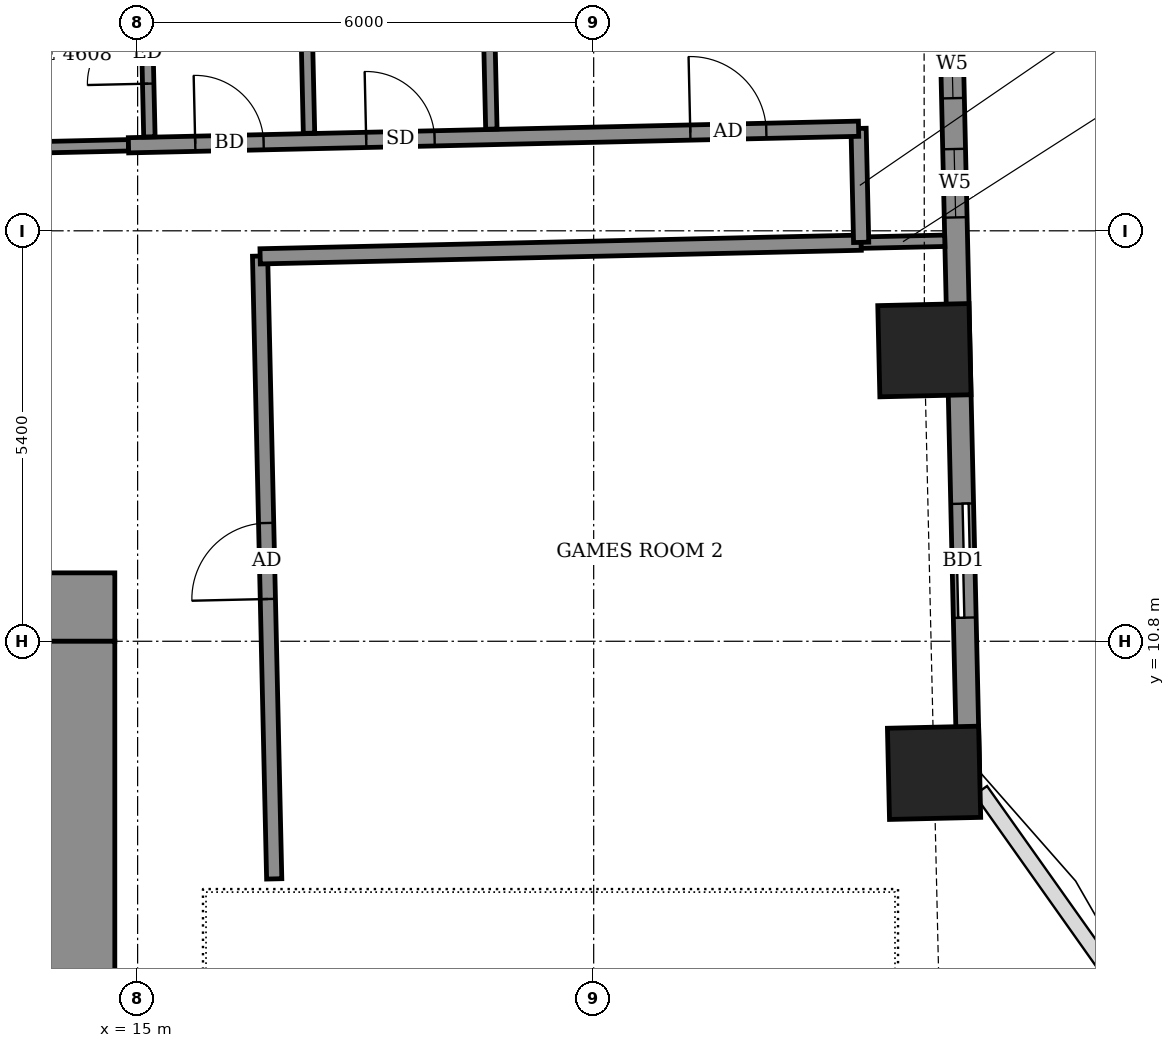
"""IFC4 building model, lengths in metres.
Left out: names, types, materials, properties, quantities, classifications, styles, units other than length and angle.
Written with IfcOpenShell. Run it as: python <this file> out.ifc"""

import sys

from ifc_helpers import new_model, si_unit, direction, frame, frame_2d, origin, origin_2d, place, context, subcontext, project, spatial, rectangle, extrude, element, fill, save


model = new_model("IFC4")
c1 = context("Model", 3, precision=1e-05, world=origin(), true_north=direction((0.0, 1.0)))
c2 = subcontext(c1, "Body", "Model", "MODEL_VIEW")
j1 = project(units=[si_unit("LENGTHUNIT", "METRE"), si_unit("PLANEANGLEUNIT", "RADIAN")], contexts=[c1])
p1 = place(None, origin())
s1 = spatial("IfcSite", under=j1, at=p1, CompositionType="ELEMENT")
p2 = place(p1, origin())
s2 = spatial("IfcBuilding", under=s1, at=p2, CompositionType="ELEMENT")
p3 = place(p2, frame((0.0, 0.0, 182.5)))
s3 = spatial("IfcBuildingStorey", under=s2, at=p3, CompositionType="ELEMENT", Elevation=182.5)
for number, where, z_axis, x_axis in (
    (1, (25.478, 9.069, -0.55), (0.0, 0.0, 1.0), (-0.023, 1.0, 0.0)),
    (2, (25.351, 14.629, -0.55), (0.0, 0.0, 1.0), (-0.023, 1.0, 0.0)),
):
    element("IfcColumn", number, at=place(p3, frame(where, z_axis=z_axis, x_axis=x_axis)), inside=s3, PredefinedType="COLUMN", context=c2, shape_type="SweptSolid", body=[
        extrude(rectangle(XDim=1.2, YDim=1.2, at=origin_2d()), origin(), (0.0, 0.0, 1.0), 3.6),
    ])
p4 = place(p3, frame((25.929, 9.025, 0.0), z_axis=(0.0, 0.0, 1.0), x_axis=(-0.022667601583, 0.999743056909, 0.0)))
e3 = element("IfcWall", 3, at=p4, inside=s3, PredefinedType="SOLIDWALL", context=c2, shape_type="SweptSolid", body=[
    extrude(rectangle(XDim=11.029, YDim=0.3, at=frame_2d((5.515, 0.0))), origin(), (0.0, 0.0, 1.0), 3.05),
])
p5 = place(p4, frame((2.086, 0.0, 0.0)))
e4 = element("IfcOpeningElement", 4, at=p5, cuts=e3, PredefinedType="OPENING", context=c2, shape_type="SweptSolid", body=[
    extrude(rectangle(XDim=1.5, YDim=2.4, at=frame_2d((0.75, 1.2))), frame((0.0, 0.16, 0.0), z_axis=(0.0, -1.0, 0.0), x_axis=(1.0, 0.0, 0.0)), (0.0, 0.0, 1.0), 0.32),
])
p6 = place(p4, frame((7.353, 0.0, 0.9)))
e5 = element("IfcOpeningElement", 5, at=p6, cuts=e3, PredefinedType="OPENING", context=c2, shape_type="SweptSolid", body=[
    extrude(rectangle(XDim=0.9, YDim=1.5, at=frame_2d((0.45, 0.75))), frame((0.0, 0.16, 0.0), z_axis=(0.0, -1.0, 0.0), x_axis=(1.0, 0.0, 0.0)), (0.0, 0.0, 1.0), 0.32),
])
p7 = place(p4, frame((8.922, 0.0, 0.9)))
e6 = element("IfcOpeningElement", 6, at=p7, cuts=e3, PredefinedType="OPENING", context=c2, shape_type="SweptSolid", body=[
    extrude(rectangle(XDim=0.9, YDim=1.5, at=frame_2d((0.45, 0.75))), frame((0.0, 0.16, 0.0), z_axis=(0.0, -1.0, 0.0), x_axis=(1.0, 0.0, 0.0)), (0.0, 0.0, 1.0), 0.32),
])
p8 = place(p3, frame((16.797, 7.674, 0.0), z_axis=(0.0, 0.0, 1.0), x_axis=(-0.022698399288, 0.999742358145, 0.0)))
e7 = element("IfcWall", 7, at=p8, inside=s3, PredefinedType="PARTITIONING", context=c2, shape_type="SweptSolid", body=[
    extrude(rectangle(XDim=8.196, YDim=0.2, at=frame_2d((4.098, 0.0))), origin(), (0.0, 0.0, 1.0), 3.05),
])
p9 = place(p8, frame((3.683, 0.0, 0.0)))
e8 = element("IfcOpeningElement", 8, at=p9, cuts=e7, PredefinedType="OPENING", context=c2, shape_type="SweptSolid", body=[
    extrude(rectangle(XDim=1.0, YDim=2.1, at=frame_2d((0.5, 1.05))), frame((0.0, 0.11, 0.0), z_axis=(0.0, -1.0, 0.0), x_axis=(1.0, 0.0, 0.0)), (0.0, 0.0, 1.0), 0.22),
])
p10 = place(p3, frame((16.612, 15.864, 0.0), z_axis=(0.0, 0.0, 1.0), x_axis=(0.999741181744, 0.022750154412, 0.0)))
e9 = element("IfcWall", 9, at=p10, inside=s3, PredefinedType="PARTITIONING", context=c2, shape_type="SweptSolid", body=[
    extrude(rectangle(XDim=7.909, YDim=0.2, at=frame_2d((3.955, 0.0))), origin(), (0.0, 0.0, 1.0), 3.05),
])
p11 = place(p3, frame((24.519, 16.044, 0.0), z_axis=(0.0, 0.0, 1.0), x_axis=(0.999738732953, 0.022857511541, 0.0)))
e10 = element("IfcWall", 10, at=p11, inside=s3, PredefinedType="PARTITIONING", context=c2, shape_type="SweptSolid", body=[
    extrude(rectangle(XDim=1.1, YDim=0.15, at=frame_2d((0.55, 0.0))), origin(), (0.0, 0.0, 1.0), 2.55),
])
p12 = place(p3, frame((24.519, 16.048, 0.0), z_axis=(0.0, 0.0, 1.0), x_axis=(-0.022632637625, 0.99974384905, 0.0)))
e11 = element("IfcWall", 11, at=p12, inside=s3, PredefinedType="PARTITIONING", context=c2, shape_type="SweptSolid", body=[
    extrude(rectangle(XDim=1.5, YDim=0.2, at=frame_2d((0.75, 0.0))), origin(), (0.0, 0.0, 1.0), 3.05),
])
p13 = place(p3, frame((-15.649, 16.633, 0.0), z_axis=(0.0, 0.0, 1.0), x_axis=(0.999743261737, 0.022658565952, 0.0)))
e12 = element("IfcWall", 12, at=p13, inside=s3, PredefinedType="PARTITIONING", context=c2, shape_type="SweptSolid", body=[
    extrude(rectangle(XDim=30.536, YDim=0.15, at=frame_2d((15.268, 0.0))), origin(), (0.0, 0.0, 1.0), 3.05),
])
p14 = place(p13, frame((24.44, 0.0, 0.0)))
e13 = element("IfcOpeningElement", 13, at=p14, cuts=e12, PredefinedType="OPENING", context=c2, shape_type="SweptSolid", body=[
    extrude(rectangle(XDim=0.9, YDim=2.1, at=frame_2d((0.45, 1.05))), frame((0.0, 0.085, 0.0), z_axis=(0.0, -1.0, 0.0), x_axis=(1.0, 0.0, 0.0)), (0.0, 0.0, 1.0), 0.17),
])
p15 = place(p13, frame((22.365, 0.0, 0.0)))
e14 = element("IfcOpeningElement", 14, at=p15, cuts=e12, PredefinedType="OPENING", context=c2, shape_type="SweptSolid", body=[
    extrude(rectangle(XDim=0.9, YDim=2.1, at=frame_2d((0.45, 1.05))), frame((0.0, 0.085, 0.0), z_axis=(0.0, -1.0, 0.0), x_axis=(1.0, 0.0, 0.0)), (0.0, 0.0, 1.0), 0.17),
])
p16 = place(p13, frame((15.515, 0.0, 0.0)))
e15 = element("IfcOpeningElement", 15, at=p16, cuts=e12, PredefinedType="OPENING", context=c2, shape_type="SweptSolid", body=[
    extrude(rectangle(XDim=0.9, YDim=2.1, at=frame_2d((0.45, 1.05))), frame((0.0, 0.085, 0.0), z_axis=(0.0, -1.0, 0.0), x_axis=(1.0, 0.0, 0.0)), (0.0, 0.0, 1.0), 0.17),
])
p17 = place(p13, frame((13.44, 0.0, 0.0)))
e16 = element("IfcOpeningElement", 16, at=p17, cuts=e12, PredefinedType="OPENING", context=c2, shape_type="SweptSolid", body=[
    extrude(rectangle(XDim=0.9, YDim=2.1, at=frame_2d((0.45, 1.05))), frame((0.0, 0.085, 0.0), z_axis=(0.0, -1.0, 0.0), x_axis=(1.0, 0.0, 0.0)), (0.0, 0.0, 1.0), 0.17),
])
p18 = place(p13, frame((6.565, 0.0, 0.0)))
e17 = element("IfcOpeningElement", 17, at=p18, cuts=e12, PredefinedType="OPENING", context=c2, shape_type="SweptSolid", body=[
    extrude(rectangle(XDim=0.9, YDim=2.1, at=frame_2d((0.45, 1.05))), frame((0.0, 0.085, 0.0), z_axis=(0.0, -1.0, 0.0), x_axis=(1.0, 0.0, 0.0)), (0.0, 0.0, 1.0), 0.17),
])
p19 = place(p13, frame((4.415, 0.0, 0.0)))
e18 = element("IfcOpeningElement", 18, at=p19, cuts=e12, PredefinedType="OPENING", context=c2, shape_type="SweptSolid", body=[
    extrude(rectangle(XDim=0.9, YDim=2.1, at=frame_2d((0.45, 1.05))), frame((0.0, 0.085, 0.0), z_axis=(0.0, -1.0, 0.0), x_axis=(1.0, 0.0, 0.0)), (0.0, 0.0, 1.0), 0.17),
])
p20 = place(p13, frame((0.2, 0.0, 0.0)))
e19 = element("IfcOpeningElement", 19, at=p20, cuts=e12, PredefinedType="OPENING", context=c2, shape_type="SweptSolid", body=[
    extrude(rectangle(XDim=0.9, YDim=2.1, at=frame_2d((0.45, 1.05))), frame((0.0, 0.085, 0.0), z_axis=(0.0, -1.0, 0.0), x_axis=(1.0, 0.0, 0.0)), (0.0, 0.0, 1.0), 0.17),
])
p21 = place(p3, frame((14.88, 17.325, 0.0), z_axis=(0.0, 0.0, 1.0), x_axis=(0.999742504166, 0.022691966963, 0.0)))
e20 = element("IfcWall", 20, at=p21, inside=s3, PredefinedType="PARTITIONING", context=c2, shape_type="SweptSolid", body=[
    extrude(rectangle(XDim=9.608, YDim=0.2, at=frame_2d((4.804, 0.0))), origin(), (0.0, 0.0, 1.0), 3.05),
])
p22 = place(p21, frame((7.393, 0.0, 0.0)))
e21 = element("IfcOpeningElement", 21, at=p22, cuts=e20, PredefinedType="OPENING", context=c2, shape_type="SweptSolid", body=[
    extrude(rectangle(XDim=1.0, YDim=2.1, at=frame_2d((0.5, 1.05))), frame((0.0, 0.11, 0.0), z_axis=(0.0, -1.0, 0.0), x_axis=(1.0, 0.0, 0.0)), (0.0, 0.0, 1.0), 0.22),
])
p23 = place(p21, frame((3.128, 0.0, 0.0)))
e22 = element("IfcOpeningElement", 22, at=p23, cuts=e20, PredefinedType="OPENING", context=c2, shape_type="SweptSolid", body=[
    extrude(rectangle(XDim=0.9, YDim=2.1, at=frame_2d((0.45, 1.05))), frame((0.0, 0.11, 0.0), z_axis=(0.0, -1.0, 0.0), x_axis=(1.0, 0.0, 0.0)), (0.0, 0.0, 1.0), 0.22),
])
p24 = place(p21, frame((0.878, 0.0, 0.0)))
e23 = element("IfcOpeningElement", 23, at=p24, cuts=e20, PredefinedType="OPENING", context=c2, shape_type="SweptSolid", body=[
    extrude(rectangle(XDim=0.9, YDim=2.1, at=frame_2d((0.45, 1.05))), frame((0.0, 0.11, 0.0), z_axis=(0.0, -1.0, 0.0), x_axis=(1.0, 0.0, 0.0)), (0.0, 0.0, 1.0), 0.22),
])
p25 = place(p3, frame((15.155, 17.436, 0.0), z_axis=(0.0, 0.0, 1.0), x_axis=(-0.022612884682, 0.999744296031, 0.0)))
e24 = element("IfcWall", 24, at=p25, inside=s3, PredefinedType="PARTITIONING", context=c2, shape_type="SweptSolid", body=[
    extrude(rectangle(XDim=2.3, YDim=0.15, at=frame_2d((1.15, 0.0))), origin(), (0.0, 0.0, 1.0), 3.05),
])
p26 = place(p25, frame((0.7, 0.0, 0.0)))
e25 = element("IfcOpeningElement", 25, at=p26, cuts=e24, PredefinedType="OPENING", context=c2, shape_type="SweptSolid", body=[
    extrude(rectangle(XDim=0.8, YDim=2.1, at=frame_2d((0.4, 1.05))), frame((0.0, 0.085, 0.0), z_axis=(0.0, -1.0, 0.0), x_axis=(1.0, 0.0, 0.0)), (0.0, 0.0, 1.0), 0.17),
])
p27 = place(p3, frame((17.255, 17.483, 0.0), z_axis=(0.0, 0.0, 1.0), x_axis=(-0.022667874761, 0.999743050715, 0.0)))
e26 = element("IfcWall", 26, at=p27, inside=s3, PredefinedType="PARTITIONING", context=c2, shape_type="SweptSolid", body=[
    extrude(rectangle(XDim=6.527, YDim=0.15, at=frame_2d((3.263, 0.0))), origin(), (0.0, 0.0, 1.0), 2.55),
])
p28 = place(p3, frame((19.654, 17.538, 0.0), z_axis=(0.0, 0.0, 1.0), x_axis=(-0.02260842146, 0.999744396973, 0.0)))
e27 = element("IfcWall", 27, at=p28, inside=s3, PredefinedType="PARTITIONING", context=c2, shape_type="SweptSolid", body=[
    extrude(rectangle(XDim=2.7, YDim=0.15, at=frame_2d((1.35, 0.0))), origin(), (0.0, 0.0, 1.0), 3.05),
])
p29 = place(p3, frame((-14.7, 11.25, 0.0), z_axis=(0.0, 0.0, 1.0), x_axis=(1.0, 0.0, 0.0)))
e28 = element("IfcWall", 28, at=p29, inside=s3, PredefinedType="SHEAR", context=c2, shape_type="SweptSolid", body=[
    extrude(rectangle(XDim=29.4, YDim=0.9, at=frame_2d((14.7, 0.0))), origin(), (0.0, 0.0, 1.0), 3.6),
])
p30 = place(p3, frame((14.25, -10.8, 0.0), z_axis=(0.0, 0.0, 1.0), x_axis=(0.0, 1.0, 0.0)))
e29 = element("IfcWall", 29, at=p30, inside=s3, PredefinedType="SHEAR", context=c2, shape_type="SweptSolid", body=[
    extrude(rectangle(XDim=21.6, YDim=0.9, at=frame_2d((10.8, 0.0))), origin(), (0.0, 0.0, 1.0), 3.6),
])
p31 = place(p30, frame((1.2, 0.0, 0.0)))
e30 = element("IfcOpeningElement", 30, at=p31, cuts=e29, PredefinedType="OPENING", context=c2, shape_type="SweptSolid", body=[
    extrude(rectangle(XDim=1.2, YDim=2.1, at=frame_2d((0.6, 1.05))), frame((0.0, 0.46, 0.0), z_axis=(0.0, -1.0, 0.0), x_axis=(1.0, 0.0, 0.0)), (0.0, 0.0, 1.0), 0.92),
])
p32 = place(p5, origin())
e31 = element("IfcDoor", 31, at=p32, inside=s3, OperationType="SLIDING_TO_LEFT", PredefinedType="DOOR", context=c2, shape_type="SweptSolid", body=[
    extrude(rectangle(XDim=1.5, YDim=2.4, at=frame_2d((0.75, 1.2))), frame((0.0, 0.025, 0.0), z_axis=(0.0, -1.0, 0.0), x_axis=(1.0, 0.0, 0.0)), (0.0, 0.0, 1.0), 0.05),
])
fill(e4, e31)
p33 = place(p6, origin())
e32 = element("IfcWindow", 32, at=p33, inside=s3, PartitioningType="SINGLE_PANEL", PredefinedType="WINDOW", context=c2, shape_type="SweptSolid", body=[
    extrude(rectangle(XDim=0.9, YDim=1.5, at=frame_2d((0.45, 0.75))), frame((0.0, 0.03, 0.0), z_axis=(0.0, -1.0, 0.0), x_axis=(1.0, 0.0, 0.0)), (0.0, 0.0, 1.0), 0.06),
])
fill(e5, e32)
p34 = place(p7, origin())
e33 = element("IfcWindow", 33, at=p34, inside=s3, PartitioningType="SINGLE_PANEL", PredefinedType="WINDOW", context=c2, shape_type="SweptSolid", body=[
    extrude(rectangle(XDim=0.9, YDim=1.5, at=frame_2d((0.45, 0.75))), frame((0.0, 0.03, 0.0), z_axis=(0.0, -1.0, 0.0), x_axis=(1.0, 0.0, 0.0)), (0.0, 0.0, 1.0), 0.06),
])
fill(e6, e33)
p35 = place(p9, origin())
e34 = element("IfcDoor", 34, at=p35, inside=s3, OperationType="SINGLE_SWING_RIGHT", PredefinedType="DOOR", context=c2, shape_type="SweptSolid", body=[
    extrude(rectangle(XDim=1.0, YDim=2.1, at=frame_2d((0.5, 1.05))), frame((0.0, 0.025, 0.0), z_axis=(0.0, -1.0, 0.0), x_axis=(1.0, 0.0, 0.0)), (0.0, 0.0, 1.0), 0.05),
])
fill(e8, e34)
p36 = place(p22, origin())
e35 = element("IfcDoor", 35, at=p36, inside=s3, OperationType="SINGLE_SWING_LEFT", PredefinedType="DOOR", context=c2, shape_type="SweptSolid", body=[
    extrude(rectangle(XDim=1.0, YDim=2.1, at=frame_2d((0.5, 1.05))), frame((0.0, 0.025, 0.0), z_axis=(0.0, -1.0, 0.0), x_axis=(1.0, 0.0, 0.0)), (0.0, 0.0, 1.0), 0.05),
])
fill(e21, e35)
p37 = place(p23, origin())
e36 = element("IfcDoor", 36, at=p37, inside=s3, OperationType="SINGLE_SWING_LEFT", PredefinedType="DOOR", context=c2, shape_type="SweptSolid", body=[
    extrude(rectangle(XDim=0.9, YDim=2.1, at=frame_2d((0.45, 1.05))), frame((0.0, 0.025, 0.0), z_axis=(0.0, -1.0, 0.0), x_axis=(1.0, 0.0, 0.0)), (0.0, 0.0, 1.0), 0.05),
])
fill(e22, e36)
p38 = place(p24, origin())
e37 = element("IfcDoor", 37, at=p38, inside=s3, OperationType="SINGLE_SWING_RIGHT", PredefinedType="DOOR", context=c2, shape_type="SweptSolid", body=[
    extrude(rectangle(XDim=0.9, YDim=2.1, at=frame_2d((0.45, 1.05))), frame((0.0, 0.025, 0.0), z_axis=(0.0, -1.0, 0.0), x_axis=(1.0, 0.0, 0.0)), (0.0, 0.0, 1.0), 0.05),
])
fill(e23, e37)
p39 = place(p26, origin())
e38 = element("IfcDoor", 38, at=p39, inside=s3, OperationType="SINGLE_SWING_RIGHT", PredefinedType="DOOR", context=c2, shape_type="SweptSolid", body=[
    extrude(rectangle(XDim=0.8, YDim=2.1, at=frame_2d((0.4, 1.05))), frame((0.0, 0.025, 0.0), z_axis=(0.0, -1.0, 0.0), x_axis=(1.0, 0.0, 0.0)), (0.0, 0.0, 1.0), 0.05),
])
fill(e25, e38)
save(model, sys.argv[1])
